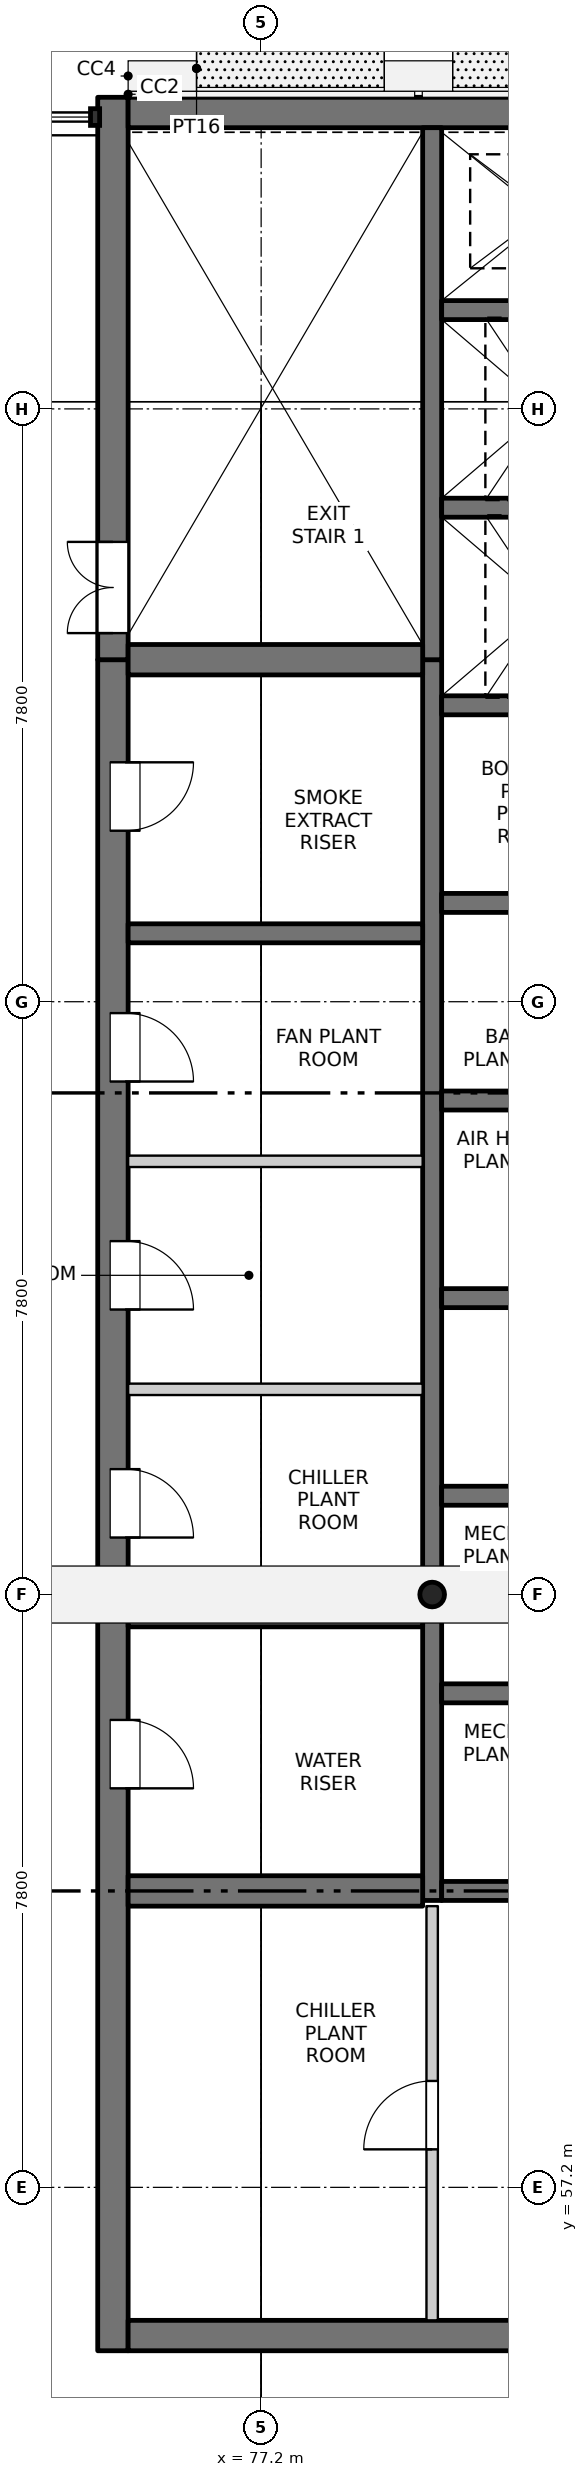
"""IFC4 building model, lengths in metres.
Left out: names, types, materials, properties, quantities, classifications, styles, units other than length and angle.
Written with IfcOpenShell. Run it as: python <this file> out.ifc"""

import sys

from ifc_helpers import new_model, si_unit, direction, frame, frame_2d, origin, origin_2d, place, context, subcontext, project, spatial, rectangle, hollow_circle, extrude, element, fill, save


model = new_model("IFC4")
c1 = context("Model", 3, precision=1e-05, world=origin(), true_north=direction((0.0, 1.0)))
c2 = subcontext(c1, "Body", "Model", "MODEL_VIEW")
j1 = project(units=[si_unit("LENGTHUNIT", "METRE"), si_unit("PLANEANGLEUNIT", "RADIAN")], contexts=[c1])
p1 = place(None, origin())
s1 = spatial("IfcSite", under=j1, at=p1, CompositionType="ELEMENT")
p2 = place(p1, origin())
s2 = spatial("IfcBuilding", under=s1, at=p2, CompositionType="ELEMENT")
p3 = place(p2, frame((0.0, 0.0, 266.4)))
s3 = spatial("IfcBuildingStorey", under=s2, at=p3, CompositionType="ELEMENT", Elevation=266.4)
p4 = place(p3, frame((75.25, 55.05, -0.3), z_axis=(0.0, 0.0, 1.0), x_axis=(0.0, 1.0, 0.0)))
e1 = element("IfcWall", 1, at=p4, inside=s3, PredefinedType="SOLIDWALL", context=c2, shape_type="SweptSolid", body=[
    extrude(rectangle(XDim=22.25, YDim=0.4, at=frame_2d((11.125, 0.0))), origin(), (0.0, 0.0, 1.0), 6.0),
])
p5 = place(p4, frame((7.4, 0.0, 0.3)))
e2 = element("IfcOpeningElement", 2, at=p5, cuts=e1, PredefinedType="OPENING", context=c2, shape_type="SweptSolid", body=[
    extrude(rectangle(XDim=0.9, YDim=2.1, at=frame_2d((0.45, 1.05))), frame((0.0, 0.21, 0.0), z_axis=(0.0, -1.0, 0.0), x_axis=(1.0, 0.0, 0.0)), (0.0, 0.0, 1.0), 0.42),
])
p6 = place(p4, frame((10.7, 0.0, 0.3)))
e3 = element("IfcOpeningElement", 3, at=p6, cuts=e1, PredefinedType="OPENING", context=c2, shape_type="SweptSolid", body=[
    extrude(rectangle(XDim=0.9, YDim=2.1, at=frame_2d((0.45, 1.05))), frame((0.0, 0.21, 0.0), z_axis=(0.0, -1.0, 0.0), x_axis=(1.0, 0.0, 0.0)), (0.0, 0.0, 1.0), 0.42),
])
p7 = place(p4, frame((13.7, 0.0, 0.3)))
e4 = element("IfcOpeningElement", 4, at=p7, cuts=e1, PredefinedType="OPENING", context=c2, shape_type="SweptSolid", body=[
    extrude(rectangle(XDim=0.9, YDim=2.1, at=frame_2d((0.45, 1.05))), frame((0.0, 0.21, 0.0), z_axis=(0.0, -1.0, 0.0), x_axis=(1.0, 0.0, 0.0)), (0.0, 0.0, 1.0), 0.42),
])
p8 = place(p4, frame((16.7, 0.0, 0.3)))
e5 = element("IfcOpeningElement", 5, at=p8, cuts=e1, PredefinedType="OPENING", context=c2, shape_type="SweptSolid", body=[
    extrude(rectangle(XDim=0.9, YDim=2.1, at=frame_2d((0.45, 1.05))), frame((0.0, 0.21, 0.0), z_axis=(0.0, -1.0, 0.0), x_axis=(1.0, 0.0, 0.0)), (0.0, 0.0, 1.0), 0.42),
])
p9 = place(p4, frame((20.0, 0.0, 0.3)))
e6 = element("IfcOpeningElement", 6, at=p9, cuts=e1, PredefinedType="OPENING", context=c2, shape_type="SweptSolid", body=[
    extrude(rectangle(XDim=0.9, YDim=2.1, at=frame_2d((0.45, 1.05))), frame((0.0, 0.21, 0.0), z_axis=(0.0, -1.0, 0.0), x_axis=(1.0, 0.0, 0.0)), (0.0, 0.0, 1.0), 0.42),
])
p10 = place(p3, frame((75.25, 77.3, -0.3), z_axis=(0.0, 0.0, 1.0), x_axis=(0.0, 1.0, 0.0)))
e7 = element("IfcWall", 7, at=p10, inside=s3, PredefinedType="SOLIDWALL", context=c2, shape_type="SweptSolid", body=[
    extrude(rectangle(XDim=7.4, YDim=0.4, at=frame_2d((3.7, 0.0))), origin(), (0.0, 0.0, 1.0), 6.0),
])
p11 = place(p10, frame((0.35, 0.0, 0.3)))
e8 = element("IfcOpeningElement", 8, at=p11, cuts=e7, PredefinedType="OPENING", context=c2, shape_type="SweptSolid", body=[
    extrude(rectangle(XDim=1.2, YDim=2.1, at=frame_2d((0.6, 1.05))), frame((0.0, 0.21, 0.0), z_axis=(0.0, -1.0, 0.0), x_axis=(1.0, 0.0, 0.0)), (0.0, 0.0, 1.0), 0.42),
])
p12 = place(p3, frame((75.45, 55.25, -0.3), z_axis=(0.0, 0.0, 1.0), x_axis=(1.0, 0.0, 0.0)))
e9 = element("IfcWall", 9, at=p12, inside=s3, PredefinedType="SOLIDWALL", context=c2, shape_type="SweptSolid", body=[
    extrude(rectangle(XDim=19.1, YDim=0.4, at=frame_2d((9.55, 0.0))), origin(), (0.0, 0.0, 1.0), 6.0),
])
p13 = place(p12, frame((8.8, 0.0, 0.3)))
e10 = element("IfcOpeningElement", 10, at=p13, cuts=e9, PredefinedType="OPENING", context=c2, shape_type="SweptSolid", body=[
    extrude(rectangle(XDim=1.5, YDim=2.1, at=frame_2d((0.75, 1.05))), frame((0.0, 0.21, 0.0), z_axis=(0.0, -1.0, 0.0), x_axis=(1.0, 0.0, 0.0)), (0.0, 0.0, 1.0), 0.42),
])
p14 = place(p3, frame((75.45, 84.5, -0.3), z_axis=(0.0, 0.0, 1.0), x_axis=(1.0, 0.0, 0.0)))
e11 = element("IfcWall", 11, at=p14, inside=s3, PredefinedType="SOLIDWALL", context=c2, shape_type="SweptSolid", body=[
    extrude(rectangle(XDim=19.1, YDim=0.4, at=frame_2d((9.55, 0.0))), origin(), (0.0, 0.0, 1.0), 6.0),
])
p15 = place(p3, frame((79.45, 60.975, -0.3), z_axis=(0.0, 0.0, 1.0), x_axis=(0.0, 1.0, 0.0)))
e12 = element("IfcWall", 12, at=p15, inside=s3, PredefinedType="SOLIDWALL", context=c2, shape_type="SweptSolid", body=[
    extrude(rectangle(XDim=16.325, YDim=0.25, at=frame_2d((8.163, 0.0))), origin(), (0.0, 0.0, 1.0), 6.0),
])
p16 = place(p3, frame((79.45, 77.3, -0.3), z_axis=(0.0, 0.0, 1.0), x_axis=(0.0, 1.0, 0.0)))
e13 = element("IfcWall", 13, at=p16, inside=s3, PredefinedType="SOLIDWALL", context=c2, shape_type="SweptSolid", body=[
    extrude(rectangle(XDim=7.0, YDim=0.25, at=frame_2d((3.5, 0.0))), origin(), (0.0, 0.0, 1.0), 6.0),
])
for number, where, z_axis, x_axis in (
    (14, (79.575, 61.1, -0.3), (0.0, 0.0, 1.0), (1.0, 0.0, 0.0)),
    (15, (79.575, 63.7, -0.3), (0.0, 0.0, 1.0), (1.0, 0.0, 0.0)),
    (16, (79.575, 66.3, -0.3), (0.0, 0.0, 1.0), (1.0, 0.0, 0.0)),
    (17, (79.575, 68.9, -0.3), (0.0, 0.0, 1.0), (1.0, 0.0, 0.0)),
    (18, (79.575, 71.5, -0.3), (0.0, 0.0, 1.0), (1.0, 0.0, 0.0)),
    (19, (79.575, 74.1, -0.3), (0.0, 0.0, 1.0), (1.0, 0.0, 0.0)),
    (20, (79.575, 76.7, -0.3), (0.0, 0.0, 1.0), (1.0, 0.0, 0.0)),
    (21, (79.575, 79.3, -0.3), (0.0, 0.0, 1.0), (1.0, 0.0, 0.0)),
    (22, (79.575, 81.9, -0.3), (0.0, 0.0, 1.0), (1.0, 0.0, 0.0)),
):
    element("IfcWall", number, at=place(p3, frame(where, z_axis=z_axis, x_axis=x_axis)), inside=s3, PredefinedType="SOLIDWALL", context=c2, shape_type="SweptSolid", body=[
        extrude(rectangle(XDim=3.0, YDim=0.25, at=frame_2d((1.5, 0.0))), origin(), (0.0, 0.0, 1.0), 6.0),
    ])
p17 = place(p3, frame((75.45, 61.1, -0.3), z_axis=(0.0, 0.0, 1.0), x_axis=(1.0, 0.0, 0.0)))
e23 = element("IfcWall", 23, at=p17, inside=s3, PredefinedType="SOLIDWALL", context=c2, shape_type="SweptSolid", body=[
    extrude(rectangle(XDim=3.875, YDim=0.4, at=frame_2d((1.938, 0.0))), origin(), (0.0, 0.0, 1.0), 6.0),
])
for number, where, z_axis, x_axis in (
    (24, (75.45, 64.7, -0.3), (0.0, 0.0, 1.0), (1.0, 0.0, 0.0)),
    (25, (75.45, 73.7, -0.3), (0.0, 0.0, 1.0), (1.0, 0.0, 0.0)),
):
    element("IfcWall", number, at=place(p3, frame(where, z_axis=z_axis, x_axis=x_axis)), inside=s3, PredefinedType="SOLIDWALL", context=c2, shape_type="SweptSolid", body=[
        extrude(rectangle(XDim=3.875, YDim=0.25, at=frame_2d((1.938, 0.0))), origin(), (0.0, 0.0, 1.0), 6.0),
    ])
p18 = place(p3, frame((75.45, 77.3, -0.3), z_axis=(0.0, 0.0, 1.0), x_axis=(1.0, 0.0, 0.0)))
e26 = element("IfcWall", 26, at=p18, inside=s3, PredefinedType="SOLIDWALL", context=c2, shape_type="SweptSolid", body=[
    extrude(rectangle(XDim=3.875, YDim=0.4, at=frame_2d((1.938, 0.0))), origin(), (0.0, 0.0, 1.0), 6.0),
])
p19 = place(p3, frame((79.45, 65.0, 6.996), z_axis=(0.0, 0.0, 1.0), x_axis=(1.0, 0.0, 0.0)))
e27 = element("IfcColumn", 27, at=p19, inside=s3, PredefinedType="COLUMN", context=c2, shape_type="SweptSolid", body=[
    extrude(hollow_circle(Radius=0.163, WallThickness=0.012, at=origin_2d()), origin(), (0.0, 0.0, 1.0), 8.212),
])
for number, where, z_axis, x_axis in (
    (28, (75.45, 67.7, 0.0), (0.0, 0.0, 1.0), (1.0, 0.0, 0.0)),
    (29, (75.45, 70.7, 0.0), (0.0, 0.0, 1.0), (1.0, 0.0, 0.0)),
):
    element("IfcWall", number, at=place(p3, frame(where, z_axis=z_axis, x_axis=x_axis)), inside=s3, PredefinedType="PARTITIONING", context=c2, shape_type="SweptSolid", body=[
        extrude(rectangle(XDim=3.875, YDim=0.15, at=frame_2d((1.938, 0.0))), origin(), (0.0, 0.0, 1.0), 5.7),
    ])
p20 = place(p3, frame((79.45, 55.45, 0.0), z_axis=(0.0, 0.0, 1.0), x_axis=(0.0, 1.0, 0.0)))
e30 = element("IfcWall", 30, at=p20, inside=s3, PredefinedType="PARTITIONING", context=c2, shape_type="SweptSolid", body=[
    extrude(rectangle(XDim=5.45, YDim=0.15, at=frame_2d((2.725, 0.0))), origin(), (0.0, 0.0, 1.0), 5.7),
])
p21 = place(p20, frame((2.25, 0.0, 0.0)))
e31 = element("IfcOpeningElement", 31, at=p21, cuts=e30, PredefinedType="OPENING", context=c2, shape_type="SweptSolid", body=[
    extrude(rectangle(XDim=0.9, YDim=2.1, at=frame_2d((0.45, 1.05))), frame((0.0, 0.085, 0.0), z_axis=(0.0, -1.0, 0.0), x_axis=(1.0, 0.0, 0.0)), (0.0, 0.0, 1.0), 0.17),
])
p22 = place(p11, origin())
e32 = element("IfcDoor", 32, at=p22, inside=s3, OperationType="DOUBLE_DOOR_SINGLE_SWING", PredefinedType="DOOR", context=c2, shape_type="SweptSolid", body=[
    extrude(rectangle(XDim=1.2, YDim=2.1, at=frame_2d((0.6, 1.05))), frame((0.0, 0.025, 0.0), z_axis=(0.0, -1.0, 0.0), x_axis=(1.0, 0.0, 0.0)), (0.0, 0.0, 1.0), 0.05),
])
fill(e8, e32)
p23 = place(p21, origin())
e33 = element("IfcDoor", 33, at=p23, inside=s3, OperationType="SINGLE_SWING_LEFT", PredefinedType="DOOR", context=c2, shape_type="SweptSolid", body=[
    extrude(rectangle(XDim=0.9, YDim=2.1, at=frame_2d((0.45, 1.05))), frame((0.0, 0.025, 0.0), z_axis=(0.0, -1.0, 0.0), x_axis=(1.0, 0.0, 0.0)), (0.0, 0.0, 1.0), 0.05),
])
fill(e31, e33)
p24 = place(p5, origin())
e34 = element("IfcDoor", 34, at=p24, inside=s3, OperationType="SINGLE_SWING_RIGHT", PredefinedType="DOOR", context=c2, shape_type="SweptSolid", body=[
    extrude(rectangle(XDim=0.9, YDim=2.1, at=frame_2d((0.45, 1.05))), frame((0.0, -0.135, 0.0), z_axis=(0.0, -1.0, 0.0), x_axis=(1.0, 0.0, 0.0)), (0.0, 0.0, 1.0), 0.05),
])
fill(e2, e34)
p25 = place(p6, origin())
e35 = element("IfcDoor", 35, at=p25, inside=s3, OperationType="SINGLE_SWING_RIGHT", PredefinedType="DOOR", context=c2, shape_type="SweptSolid", body=[
    extrude(rectangle(XDim=0.9, YDim=2.1, at=frame_2d((0.45, 1.05))), frame((0.0, -0.135, 0.0), z_axis=(0.0, -1.0, 0.0), x_axis=(1.0, 0.0, 0.0)), (0.0, 0.0, 1.0), 0.05),
])
fill(e3, e35)
p26 = place(p7, origin())
e36 = element("IfcDoor", 36, at=p26, inside=s3, OperationType="SINGLE_SWING_RIGHT", PredefinedType="DOOR", context=c2, shape_type="SweptSolid", body=[
    extrude(rectangle(XDim=0.9, YDim=2.1, at=frame_2d((0.45, 1.05))), frame((0.0, -0.135, 0.0), z_axis=(0.0, -1.0, 0.0), x_axis=(1.0, 0.0, 0.0)), (0.0, 0.0, 1.0), 0.05),
])
fill(e4, e36)
p27 = place(p8, origin())
e37 = element("IfcDoor", 37, at=p27, inside=s3, OperationType="SINGLE_SWING_RIGHT", PredefinedType="DOOR", context=c2, shape_type="SweptSolid", body=[
    extrude(rectangle(XDim=0.9, YDim=2.1, at=frame_2d((0.45, 1.05))), frame((0.0, -0.135, 0.0), z_axis=(0.0, -1.0, 0.0), x_axis=(1.0, 0.0, 0.0)), (0.0, 0.0, 1.0), 0.05),
])
fill(e5, e37)
p28 = place(p9, origin())
e38 = element("IfcDoor", 38, at=p28, inside=s3, OperationType="SINGLE_SWING_LEFT", PredefinedType="DOOR", context=c2, shape_type="SweptSolid", body=[
    extrude(rectangle(XDim=0.9, YDim=2.1, at=frame_2d((0.45, 1.05))), frame((0.0, -0.135, 0.0), z_axis=(0.0, -1.0, 0.0), x_axis=(1.0, 0.0, 0.0)), (0.0, 0.0, 1.0), 0.05),
])
fill(e6, e38)
save(model, sys.argv[1])
